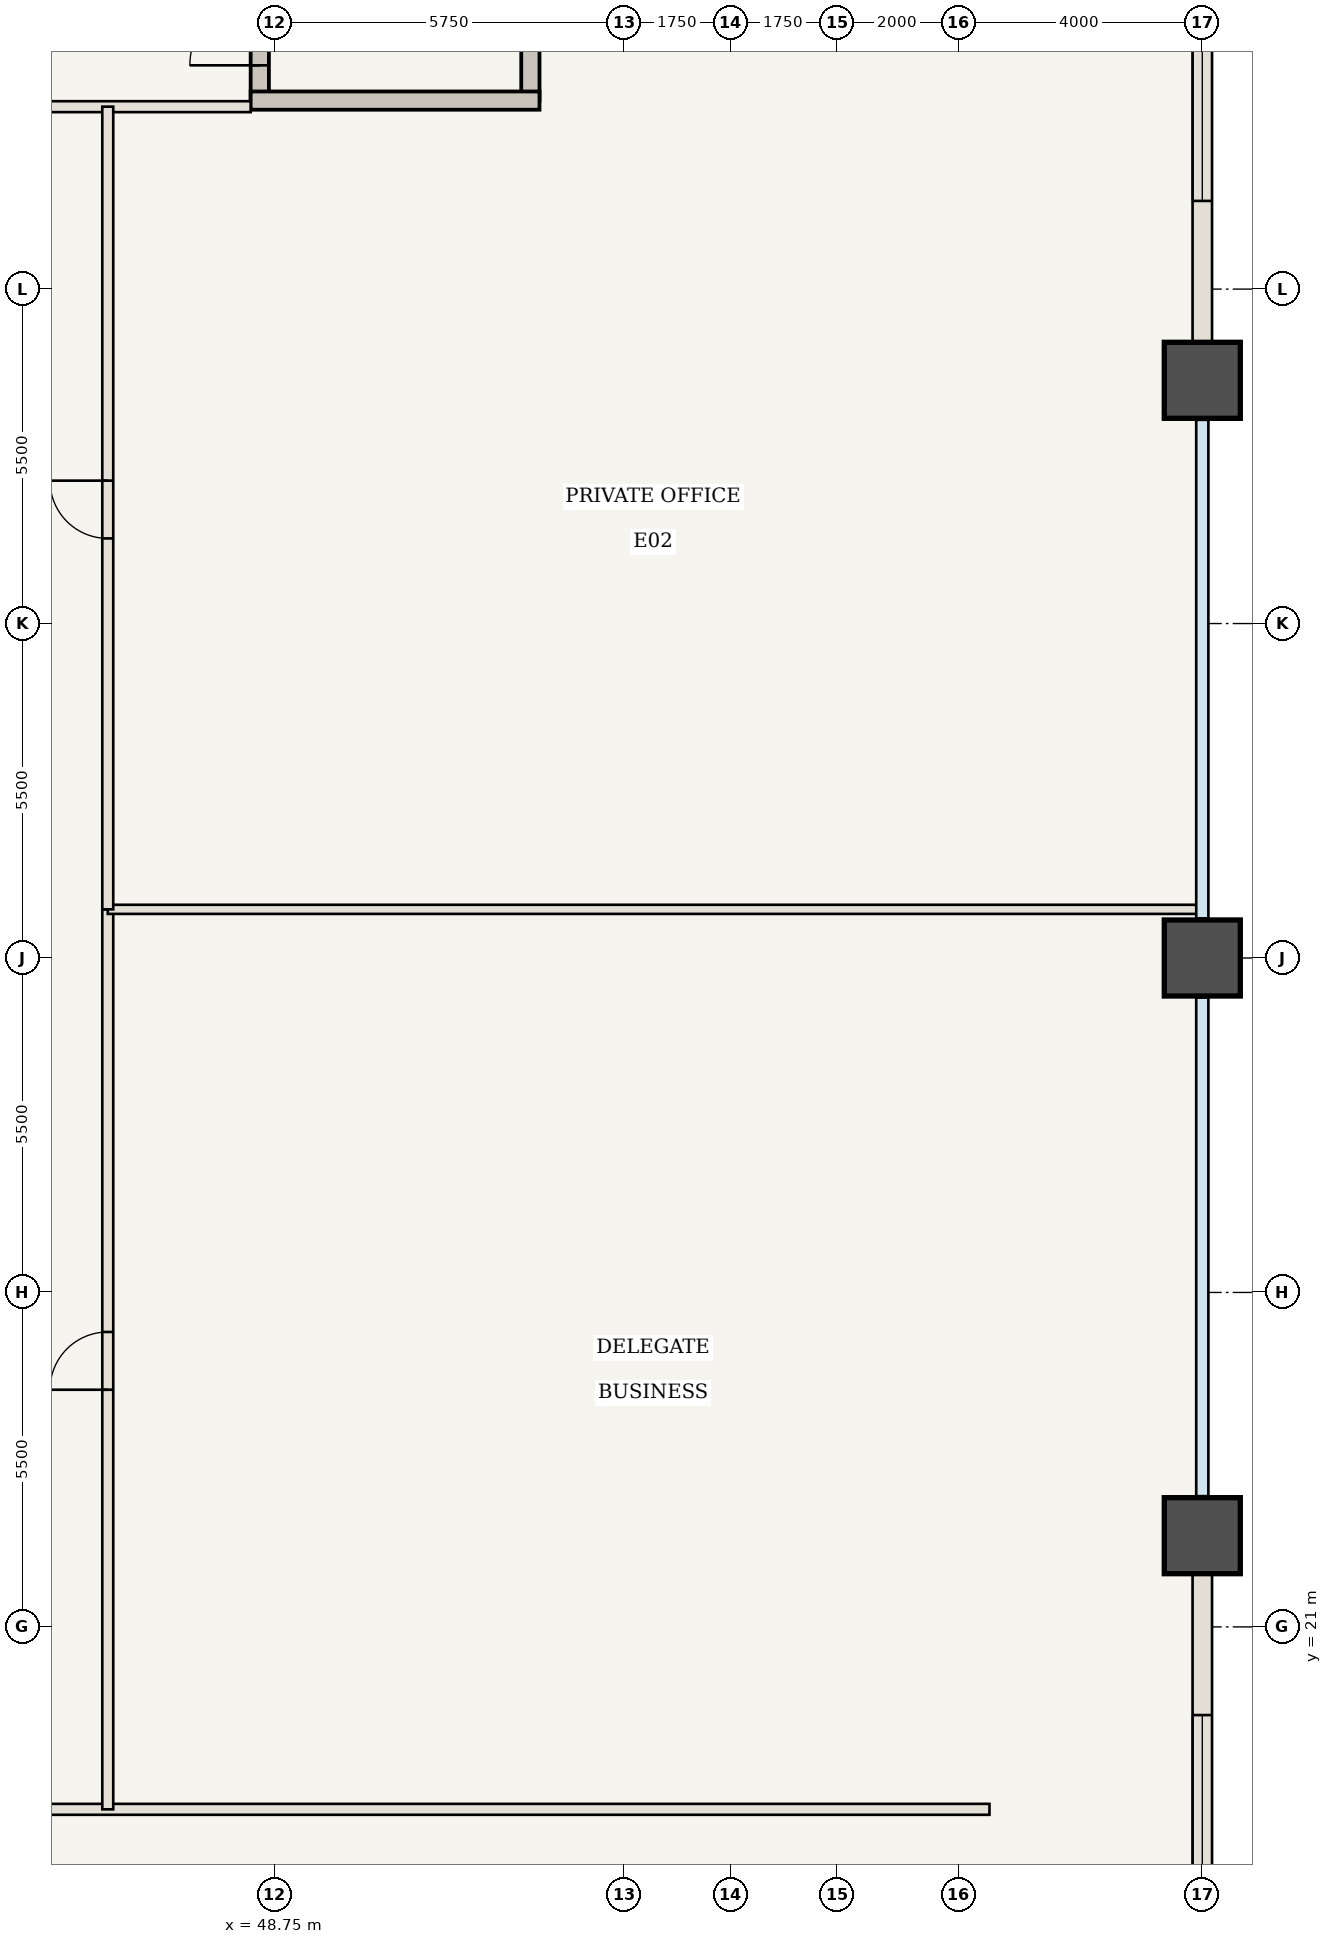
"""IFC4 building model, lengths in metres.
Left out: names, types, materials, properties, quantities, classifications, styles, units other than length and angle.
Written with IfcOpenShell. Run it as: python <this file> out.ifc"""

import sys

from ifc_helpers import new_model, si_unit, direction, frame, frame_2d, origin, origin_2d, place, context, subcontext, project, spatial, rectangle, extrude, element, fill, save


model = new_model("IFC4")
c1 = context("Model", 3, precision=1e-05, world=origin(), true_north=direction((0.0, 1.0)))
c2 = subcontext(c1, "Body", "Model", "MODEL_VIEW")
j1 = project(units=[si_unit("LENGTHUNIT", "METRE"), si_unit("PLANEANGLEUNIT", "RADIAN")], contexts=[c1])
p1 = place(None, origin())
s1 = spatial("IfcSite", under=j1, at=p1, CompositionType="ELEMENT")
p2 = place(p1, origin())
s2 = spatial("IfcBuilding", under=s1, at=p2, CompositionType="ELEMENT")
p3 = place(p2, frame((0.0, 0.0, 17.85)))
s3 = spatial("IfcBuildingStorey", under=s2, at=p3, CompositionType="ELEMENT", Elevation=17.85)
for number, where, z_axis, x_axis in (
    (1, (64.0, 22.5, 0.0), (0.0, 0.0, 1.0), (1.0, 0.0, 0.0)),
    (2, (64.0, 32.0, 0.0), (0.0, 0.0, 1.0), (1.0, 0.0, 0.0)),
    (3, (64.0, 41.5, 0.0), (0.0, 0.0, 1.0), (1.0, 0.0, 0.0)),
):
    element("IfcColumn", number, at=place(p3, frame(where, z_axis=z_axis, x_axis=x_axis)), inside=s3, PredefinedType="COLUMN", context=c2, shape_type="SweptSolid", body=[
        extrude(rectangle(XDim=1.25, YDim=1.25, at=origin_2d()), origin(), (0.0, 0.0, 1.0), 5.95),
    ])
p4 = place(p3, frame((48.5, 46.1, 0.0), z_axis=(0.0, 0.0, 1.0), x_axis=(0.0, 1.0, 0.0)))
e4 = element("IfcWall", 4, at=p4, inside=s3, PredefinedType="SHEAR", context=c2, shape_type="SweptSolid", body=[
    extrude(rectangle(XDim=10.5, YDim=0.3, at=frame_2d((5.25, 0.0))), origin(), (0.0, 0.0, 1.0), 5.71),
])
p5 = place(p4, frame((0.58, 0.0, 0.0)))
e5 = element("IfcOpeningElement", 5, at=p5, cuts=e4, PredefinedType="OPENING", context=c2, shape_type="SweptSolid", body=[
    extrude(rectangle(XDim=1.15, YDim=2.15, at=frame_2d((0.575, 1.075))), frame((0.0, 0.16, 0.0), z_axis=(0.0, -1.0, 0.0), x_axis=(1.0, 0.0, 0.0)), (0.0, 0.0, 1.0), 0.32),
])
p6 = place(p3, frame((52.95, 46.1, 0.0), z_axis=(0.0, 0.0, 1.0), x_axis=(0.0, 1.0, 0.0)))
e6 = element("IfcWall", 6, at=p6, inside=s3, PredefinedType="SHEAR", context=c2, shape_type="SweptSolid", body=[
    extrude(rectangle(XDim=10.5, YDim=0.3, at=frame_2d((5.25, 0.0))), origin(), (0.0, 0.0, 1.0), 5.71),
])
p7 = place(p3, frame((48.35, 46.1, 0.0), z_axis=(0.0, 0.0, 1.0), x_axis=(1.0, 0.0, 0.0)))
e7 = element("IfcWall", 7, at=p7, inside=s3, PredefinedType="SHEAR", context=c2, shape_type="SweptSolid", body=[
    extrude(rectangle(XDim=4.75, YDim=0.3, at=frame_2d((2.375, 0.0))), origin(), (0.0, 0.0, 1.0), 5.71),
])
p8 = place(p3, frame((41.5, 18.0, 0.0), z_axis=(0.0, 0.0, 1.0), x_axis=(1.0, 0.0, 0.0)))
e8 = element("IfcWall", 8, at=p8, inside=s3, PredefinedType="STANDARD", context=c2, shape_type="SweptSolid", body=[
    extrude(rectangle(XDim=19.0, YDim=0.18, at=frame_2d((9.5, 0.0))), origin(), (0.0, 0.0, 1.0), 5.71),
])
p9 = place(p8, frame((1.725, 0.0, 0.0)))
e9 = element("IfcOpeningElement", 9, at=p9, cuts=e8, PredefinedType="OPENING", context=c2, shape_type="SweptSolid", body=[
    extrude(rectangle(XDim=1.8, YDim=2.35, at=frame_2d((0.9, 1.175))), frame((0.0, 0.1, 0.0), z_axis=(0.0, -1.0, 0.0), x_axis=(1.0, 0.0, 0.0)), (0.0, 0.0, 1.0), 0.2),
])
p10 = place(p3, frame((35.5, 46.0, 0.0), z_axis=(0.0, 0.0, 1.0), x_axis=(1.0, 0.0, 0.0)))
e10 = element("IfcWall", 10, at=p10, inside=s3, PredefinedType="STANDARD", context=c2, shape_type="SweptSolid", body=[
    extrude(rectangle(XDim=12.85, YDim=0.18, at=frame_2d((6.425, 0.0))), origin(), (0.0, 0.0, 1.0), 5.71),
])
p11 = place(p10, frame((4.725, 0.0, 0.0)))
e11 = element("IfcOpeningElement", 11, at=p11, cuts=e10, PredefinedType="OPENING", context=c2, shape_type="SweptSolid", body=[
    extrude(rectangle(XDim=1.8, YDim=2.35, at=frame_2d((0.9, 1.175))), frame((0.0, 0.1, 0.0), z_axis=(0.0, -1.0, 0.0), x_axis=(1.0, 0.0, 0.0)), (0.0, 0.0, 1.0), 0.2),
])
p12 = place(p3, frame((46.0, 18.0, 0.0), z_axis=(0.0, 0.0, 1.0), x_axis=(0.0, 1.0, 0.0)))
e12 = element("IfcWall", 12, at=p12, inside=s3, PredefinedType="STANDARD", context=c2, shape_type="SweptSolid", body=[
    extrude(rectangle(XDim=14.8, YDim=0.18, at=frame_2d((7.4, 0.0))), origin(), (0.0, 0.0, 1.0), 5.71),
])
p13 = place(p12, frame((6.9, 0.0, 0.0)))
e13 = element("IfcOpeningElement", 13, at=p13, cuts=e12, PredefinedType="OPENING", context=c2, shape_type="SweptSolid", body=[
    extrude(rectangle(XDim=0.95, YDim=2.15, at=frame_2d((0.475, 1.075))), frame((0.0, 0.1, 0.0), z_axis=(0.0, -1.0, 0.0), x_axis=(1.0, 0.0, 0.0)), (0.0, 0.0, 1.0), 0.2),
])
p14 = place(p3, frame((46.0, 32.8, 0.0), z_axis=(0.0, 0.0, 1.0), x_axis=(1.0, 0.0, 0.0)))
e14 = element("IfcWall", 14, at=p14, inside=s3, PredefinedType="STANDARD", context=c2, shape_type="SweptSolid", body=[
    extrude(rectangle(XDim=17.94, YDim=0.15, at=frame_2d((8.97, 0.0))), origin(), (0.0, 0.0, 1.0), 5.71),
])
p15 = place(p3, frame((46.0, 32.8, 0.0), z_axis=(0.0, 0.0, 1.0), x_axis=(0.0, 1.0, 0.0)))
e15 = element("IfcWall", 15, at=p15, inside=s3, PredefinedType="STANDARD", context=c2, shape_type="SweptSolid", body=[
    extrude(rectangle(XDim=13.2, YDim=0.18, at=frame_2d((6.6, 0.0))), origin(), (0.0, 0.0, 1.0), 5.71),
])
p16 = place(p15, frame((6.1, 0.0, 0.0)))
e16 = element("IfcOpeningElement", 16, at=p16, cuts=e15, PredefinedType="OPENING", context=c2, shape_type="SweptSolid", body=[
    extrude(rectangle(XDim=0.95, YDim=2.15, at=frame_2d((0.475, 1.075))), frame((0.0, 0.1, 0.0), z_axis=(0.0, -1.0, 0.0), x_axis=(1.0, 0.0, 0.0)), (0.0, 0.0, 1.0), 0.2),
])
p17 = place(p3, frame((64.0, 22.5, 0.0), z_axis=(0.0, 0.0, 1.0), x_axis=(0.0, -1.0, 0.0)))
e17 = element("IfcWall", 17, at=p17, inside=s3, PredefinedType="USERDEFINED", context=c2, shape_type="SweptSolid", body=[
    extrude(rectangle(XDim=9.5, YDim=0.32, at=frame_2d((4.75, 0.0))), origin(), (0.0, 0.0, 1.0), 4.81),
])
p18 = place(p17, frame((2.95, 0.0, 0.85)))
e18 = element("IfcOpeningElement", 18, at=p18, cuts=e17, PredefinedType="OPENING", context=c2, shape_type="SweptSolid", body=[
    extrude(rectangle(XDim=3.6, YDim=2.6, at=frame_2d((1.8, 1.3))), frame((0.0, 0.17, 0.0), z_axis=(0.0, -1.0, 0.0), x_axis=(1.0, 0.0, 0.0)), (0.0, 0.0, 1.0), 0.34),
])
p19 = place(p3, frame((64.0, 51.0, 0.0), z_axis=(0.0, 0.0, 1.0), x_axis=(0.0, -1.0, 0.0)))
e19 = element("IfcWall", 19, at=p19, inside=s3, PredefinedType="USERDEFINED", context=c2, shape_type="SweptSolid", body=[
    extrude(rectangle(XDim=9.5, YDim=0.32, at=frame_2d((4.75, 0.0))), origin(), (0.0, 0.0, 1.0), 4.81),
])
p20 = place(p19, frame((2.95, 0.0, 0.85)))
e20 = element("IfcOpeningElement", 20, at=p20, cuts=e19, PredefinedType="OPENING", context=c2, shape_type="SweptSolid", body=[
    extrude(rectangle(XDim=3.6, YDim=2.6, at=frame_2d((1.8, 1.3))), frame((0.0, 0.17, 0.0), z_axis=(0.0, -1.0, 0.0), x_axis=(1.0, 0.0, 0.0)), (0.0, 0.0, 1.0), 0.34),
])
p21 = place(p5, origin())
e21 = element("IfcDoor", 21, at=p21, inside=s3, OperationType="SINGLE_SWING_LEFT", PredefinedType="DOOR", context=c2, shape_type="SweptSolid", body=[
    extrude(rectangle(XDim=1.15, YDim=2.15, at=frame_2d((0.575, 1.075))), frame((0.0, 0.025, 0.0), z_axis=(0.0, -1.0, 0.0), x_axis=(1.0, 0.0, 0.0)), (0.0, 0.0, 1.0), 0.05),
])
fill(e5, e21)
p22 = place(p13, origin())
e22 = element("IfcDoor", 22, at=p22, inside=s3, OperationType="SINGLE_SWING_LEFT", PredefinedType="DOOR", context=c2, shape_type="SweptSolid", body=[
    extrude(rectangle(XDim=0.95, YDim=2.15, at=frame_2d((0.475, 1.075))), frame((0.0, 0.025, 0.0), z_axis=(0.0, -1.0, 0.0), x_axis=(1.0, 0.0, 0.0)), (0.0, 0.0, 1.0), 0.05),
])
fill(e13, e22)
p23 = place(p16, origin())
e23 = element("IfcDoor", 23, at=p23, inside=s3, OperationType="SINGLE_SWING_RIGHT", PredefinedType="DOOR", context=c2, shape_type="SweptSolid", body=[
    extrude(rectangle(XDim=0.95, YDim=2.15, at=frame_2d((0.475, 1.075))), frame((0.0, 0.025, 0.0), z_axis=(0.0, -1.0, 0.0), x_axis=(1.0, 0.0, 0.0)), (0.0, 0.0, 1.0), 0.05),
])
fill(e16, e23)
p24 = place(p18, origin())
e24 = element("IfcWindow", 24, at=p24, inside=s3, PartitioningType="SINGLE_PANEL", PredefinedType="WINDOW", context=c2, shape_type="SweptSolid", body=[
    extrude(rectangle(XDim=3.6, YDim=2.6, at=frame_2d((1.8, 1.3))), frame((0.0, 0.03, 0.0), z_axis=(0.0, -1.0, 0.0), x_axis=(1.0, 0.0, 0.0)), (0.0, 0.0, 1.0), 0.06),
])
fill(e18, e24)
p25 = place(p20, origin())
e25 = element("IfcWindow", 25, at=p25, inside=s3, PartitioningType="SINGLE_PANEL", PredefinedType="WINDOW", context=c2, shape_type="SweptSolid", body=[
    extrude(rectangle(XDim=3.6, YDim=2.6, at=frame_2d((1.8, 1.3))), frame((0.0, 0.03, 0.0), z_axis=(0.0, -1.0, 0.0), x_axis=(1.0, 0.0, 0.0)), (0.0, 0.0, 1.0), 0.06),
])
fill(e20, e25)
save(model, sys.argv[1])
